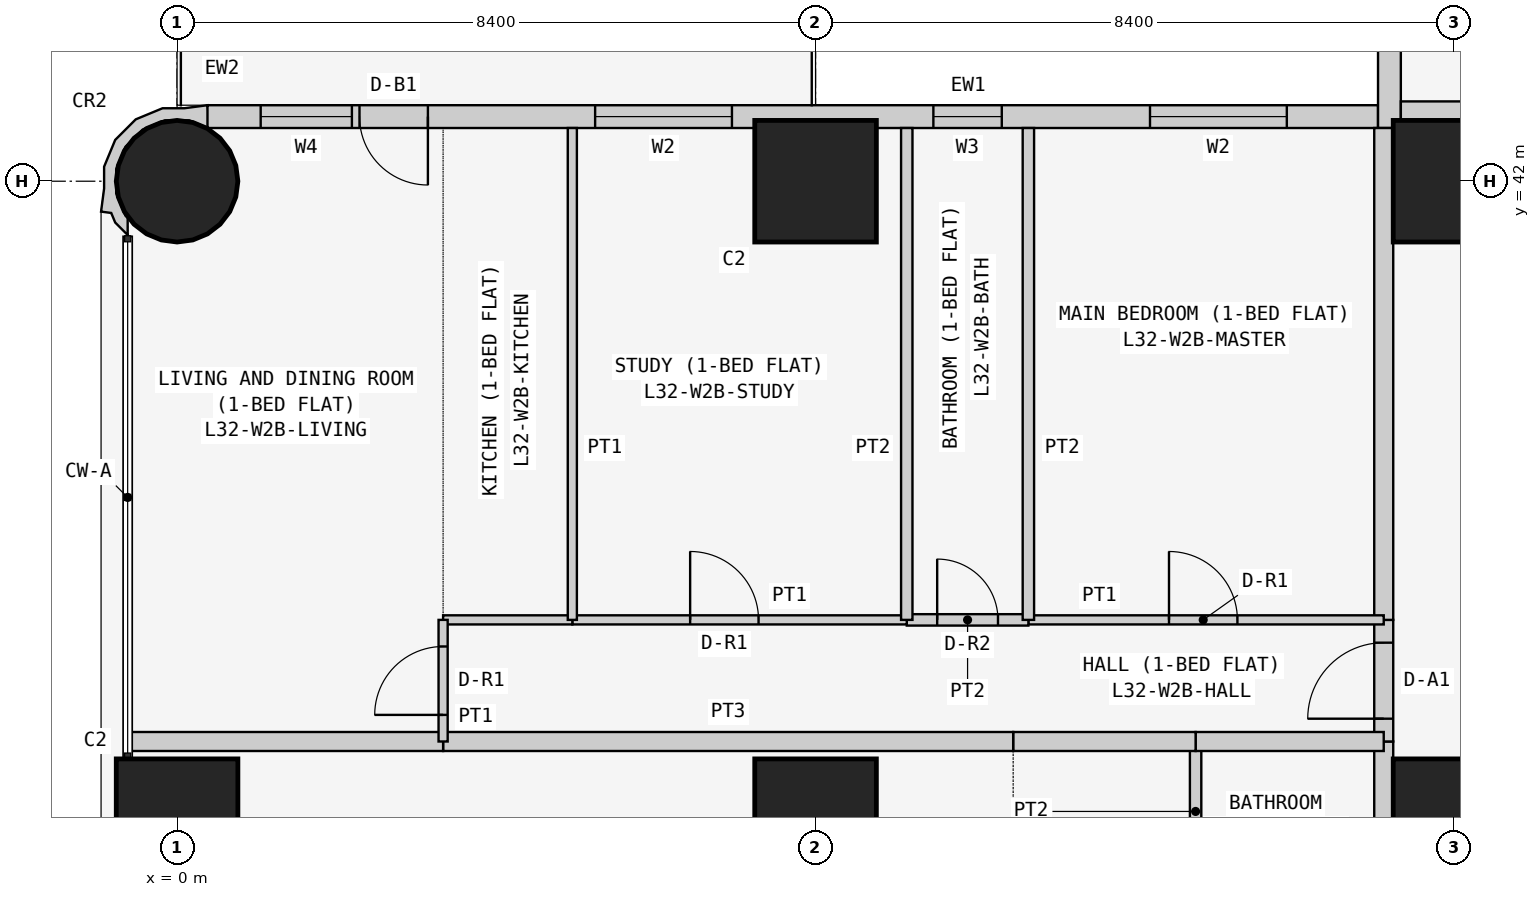
"""IFC4 building model, lengths in metres.
Left out: names, types, materials, properties, quantities, classifications, styles, units other than length and angle.
Written with IfcOpenShell. Run it as: python <this file> out.ifc"""

import sys

from ifc_helpers import new_model, si_unit, direction, frame, frame_2d, origin, origin_2d, place, context, subcontext, project, spatial, polyline, rectangle, circle, outline, extrude, element, fill, save


model = new_model("IFC4")
c1 = context("Model", 3, precision=1e-05, world=origin(), true_north=direction((0.0, 1.0)))
c2 = subcontext(c1, "Body", "Model", "MODEL_VIEW")
j1 = project(units=[si_unit("LENGTHUNIT", "METRE"), si_unit("PLANEANGLEUNIT", "RADIAN")], contexts=[c1])
p1 = place(None, origin())
s1 = spatial("IfcSite", under=j1, at=p1, CompositionType="ELEMENT")
p2 = place(p1, origin())
s2 = spatial("IfcBuilding", under=s1, at=p2, CompositionType="ELEMENT")
p3 = place(p2, frame((0.0, 0.0, 126.9)))
s3 = spatial("IfcBuildingStorey", under=s2, at=p3, CompositionType="ELEMENT", Elevation=126.9)
p4 = place(p3, frame((0.0, 33.6, 0.0), z_axis=(0.0, 0.0, 1.0), x_axis=(1.0, 0.0, 0.0)))
e1 = element("IfcColumn", 1, at=p4, inside=s3, PredefinedType="COLUMN", context=c2, shape_type="SweptSolid", body=[
    extrude(rectangle(XDim=1.6, YDim=1.6, at=origin_2d()), origin(), (0.0, 0.0, 1.0), 3.6),
])
p5 = place(p3, frame((0.0, 42.0, 0.0), z_axis=(0.0, 0.0, 1.0), x_axis=(1.0, 0.0, 0.0)))
e2 = element("IfcColumn", 2, at=p5, inside=s3, PredefinedType="COLUMN", context=c2, shape_type="SweptSolid", body=[
    extrude(circle(Radius=0.8, at=origin_2d()), origin(), (0.0, 0.0, 1.0), 3.6),
])
for number, where, z_axis, x_axis in (
    (3, (8.4, 33.6, 0.0), (0.0, 0.0, 1.0), (1.0, 0.0, 0.0)),
    (4, (8.4, 42.0, 0.0), (0.0, 0.0, 1.0), (1.0, 0.0, 0.0)),
    (5, (16.8, 33.6, 0.0), (0.0, 0.0, 1.0), (1.0, 0.0, 0.0)),
    (6, (16.8, 42.0, 0.0), (0.0, 0.0, 1.0), (1.0, 0.0, 0.0)),
):
    element("IfcColumn", number, at=place(p3, frame(where, z_axis=z_axis, x_axis=x_axis)), inside=s3, PredefinedType="COLUMN", context=c2, shape_type="SweptSolid", body=[
        extrude(rectangle(XDim=1.6, YDim=1.6, at=origin_2d()), origin(), (0.0, 0.0, 1.0), 3.6),
    ])
p6 = place(p3, frame((15.8, 42.85, 0.0), z_axis=(0.0, 0.0, 1.0), x_axis=(-1.0, 0.0, 0.0)))
e7 = element("IfcWall", 7, at=p6, inside=s3, PredefinedType="SOLIDWALL", context=c2, shape_type="SweptSolid", body=[
    extrude(rectangle(XDim=15.4, YDim=0.3, at=frame_2d((7.7, 0.0))), origin(), (0.0, 0.0, 1.0), 3.45),
])
p7 = place(p6, frame((1.2, 0.0, 0.9)))
e8 = element("IfcOpeningElement", 8, at=p7, cuts=e7, PredefinedType="OPENING", context=c2, shape_type="SweptSolid", body=[
    extrude(rectangle(XDim=1.8, YDim=1.5, at=frame_2d((0.9, 0.75))), frame((0.0, 0.16, 0.0), z_axis=(0.0, -1.0, 0.0), x_axis=(1.0, 0.0, 0.0)), (0.0, 0.0, 1.0), 0.32),
])
p8 = place(p6, frame((4.95, 0.0, 1.5)))
e9 = element("IfcOpeningElement", 9, at=p8, cuts=e7, PredefinedType="OPENING", context=c2, shape_type="SweptSolid", body=[
    extrude(rectangle(XDim=0.9, YDim=0.7, at=frame_2d((0.45, 0.35))), frame((0.0, 0.16, 0.0), z_axis=(0.0, -1.0, 0.0), x_axis=(1.0, 0.0, 0.0)), (0.0, 0.0, 1.0), 0.32),
])
p9 = place(p6, frame((8.5, 0.0, 0.9)))
e10 = element("IfcOpeningElement", 10, at=p9, cuts=e7, PredefinedType="OPENING", context=c2, shape_type="SweptSolid", body=[
    extrude(rectangle(XDim=1.8, YDim=1.5, at=frame_2d((0.9, 0.75))), frame((0.0, 0.16, 0.0), z_axis=(0.0, -1.0, 0.0), x_axis=(1.0, 0.0, 0.0)), (0.0, 0.0, 1.0), 0.32),
])
p10 = place(p6, frame((12.5, 0.0, 0.0)))
e11 = element("IfcOpeningElement", 11, at=p10, cuts=e7, PredefinedType="OPENING", context=c2, shape_type="SweptSolid", body=[
    extrude(rectangle(XDim=0.9, YDim=2.4, at=frame_2d((0.45, 1.2))), frame((0.0, 0.16, 0.0), z_axis=(0.0, -1.0, 0.0), x_axis=(1.0, 0.0, 0.0)), (0.0, 0.0, 1.0), 0.32),
])
p11 = place(p6, frame((13.5, 0.0, 0.9)))
e12 = element("IfcOpeningElement", 12, at=p11, cuts=e7, PredefinedType="OPENING", context=c2, shape_type="SweptSolid", body=[
    extrude(rectangle(XDim=1.2, YDim=1.5, at=frame_2d((0.6, 0.75))), frame((0.0, 0.16, 0.0), z_axis=(0.0, -1.0, 0.0), x_axis=(1.0, 0.0, 0.0)), (0.0, 0.0, 1.0), 0.32),
])
p12 = place(p3, frame((15.95, 50.0, 0.0), z_axis=(0.0, 0.0, 1.0), x_axis=(0.0, -1.0, 0.0)))
e13 = element("IfcWall", 13, at=p12, inside=s3, PredefinedType="SOLIDWALL", context=c2, shape_type="SweptSolid", body=[
    extrude(rectangle(XDim=7.3, YDim=0.3, at=frame_2d((3.65, 0.0))), origin(), (0.0, 0.0, 1.0), 3.45),
])
p13 = place(p12, frame((3.1, 0.0, 0.9)))
e14 = element("IfcOpeningElement", 14, at=p13, cuts=e13, PredefinedType="OPENING", context=c2, shape_type="SweptSolid", body=[
    extrude(rectangle(XDim=2.4, YDim=1.5, at=frame_2d((1.2, 0.75))), frame((0.0, 0.16, 0.0), z_axis=(0.0, -1.0, 0.0), x_axis=(1.0, 0.0, 0.0)), (0.0, 0.0, 1.0), 0.32),
])
p14 = place(p12, frame((0.75, 0.0, 0.9)))
e15 = element("IfcOpeningElement", 15, at=p14, cuts=e13, PredefinedType="OPENING", context=c2, shape_type="SweptSolid", body=[
    extrude(rectangle(XDim=1.2, YDim=1.5, at=frame_2d((0.6, 0.75))), frame((0.0, 0.16, 0.0), z_axis=(0.0, -1.0, 0.0), x_axis=(1.0, 0.0, 0.0)), (0.0, 0.0, 1.0), 0.32),
])
p15 = place(p3, frame((0.327, 42.817, 0.0), z_axis=(0.0, 0.0, 1.0), x_axis=(-0.93923434088, 0.343276641956, 0.0)))
e16 = element("IfcWall", 16, at=p15, inside=s3, PredefinedType="SOLIDWALL", context=c2, shape_type="SweptSolid", body=[
    extrude(outline(polyline([(-0.006, -0.197), (0.266, -0.055), (0.535, 0.044), (0.816, 0.302), (0.977, 0.648), (0.994, 1.03), (0.895, 1.299), (0.828, 1.598), (0.697, 1.569), (0.604, 1.67), (0.394, 1.767), (0.471, 1.556), (0.509, 1.539), (0.724, 1.304), (0.833, 1.005), (0.82, 0.687), (0.686, 0.397), (0.451, 0.182), (0.152, 0.073), (-0.116, 0.084), (-0.127, 0.078), (-0.146, 0.071), (-0.006, -0.197)])), origin(), (0.0, 0.0, 1.0), 3.45),
])
p16 = place(p3, frame((16.1, 42.925, 0.0), z_axis=(0.0, 0.0, 1.0), x_axis=(1.0, 0.0, 0.0)))
e17 = element("IfcWall", 17, at=p16, inside=s3, PredefinedType="PARTITIONING", context=c2, shape_type="SweptSolid", body=[
    extrude(rectangle(XDim=6.471, YDim=0.25, at=frame_2d((3.235, 0.0))), origin(), (0.0, 0.0, 1.0), 3.45),
])
p17 = place(p3, frame((15.875, 32.0, 0.0), z_axis=(0.0, 0.0, 1.0), x_axis=(0.0, 1.0, 0.0)))
e18 = element("IfcWall", 18, at=p17, inside=s3, PredefinedType="PARTITIONING", context=c2, shape_type="SweptSolid", body=[
    extrude(rectangle(XDim=2.629, YDim=0.25, at=frame_2d((1.314, 0.0))), origin(), (0.0, 0.0, 1.0), 3.45),
])
p18 = place(p3, frame((15.875, 34.629, 0.0), z_axis=(0.0, 0.0, 1.0), x_axis=(0.0, 1.0, 0.0)))
e19 = element("IfcWall", 19, at=p18, inside=s3, PredefinedType="PARTITIONING", context=c2, shape_type="SweptSolid", body=[
    extrude(rectangle(XDim=1.6, YDim=0.25, at=frame_2d((0.8, 0.0))), origin(), (0.0, 0.0, 1.0), 3.45),
])
p19 = place(p18, frame((0.3, 0.0, 0.0)))
e20 = element("IfcOpeningElement", 20, at=p19, cuts=e19, PredefinedType="OPENING", context=c2, shape_type="SweptSolid", body=[
    extrude(rectangle(XDim=1.0, YDim=2.1, at=frame_2d((0.5, 1.05))), frame((0.0, 0.135, 0.0), z_axis=(0.0, -1.0, 0.0), x_axis=(1.0, 0.0, 0.0)), (0.0, 0.0, 1.0), 0.27),
])
p20 = place(p3, frame((15.875, 36.229, 0.0), z_axis=(0.0, 0.0, 1.0), x_axis=(0.0, 1.0, 0.0)))
e21 = element("IfcWall", 21, at=p20, inside=s3, PredefinedType="PARTITIONING", context=c2, shape_type="SweptSolid", body=[
    extrude(rectangle(XDim=6.471, YDim=0.25, at=frame_2d((3.235, 0.0))), origin(), (0.0, 0.0, 1.0), 3.45),
])
p21 = place(p3, frame((13.4, 32.0, 0.0), z_axis=(0.0, 0.0, 1.0), x_axis=(0.0, 1.0, 0.0)))
e22 = element("IfcWall", 22, at=p21, inside=s3, PredefinedType="PARTITIONING", context=c2, shape_type="SweptSolid", body=[
    extrude(rectangle(XDim=2.629, YDim=0.15, at=frame_2d((1.314, 0.0))), origin(), (0.0, 0.0, 1.0), 3.45),
])
p22 = place(p3, frame((13.4, 34.629, 0.0), z_axis=(0.0, 0.0, 1.0), x_axis=(1.0, 0.0, 0.0)))
e23 = element("IfcWall", 23, at=p22, inside=s3, PredefinedType="PARTITIONING", context=c2, shape_type="SweptSolid", body=[
    extrude(rectangle(XDim=2.475, YDim=0.25, at=frame_2d((1.238, 0.0))), origin(), (0.0, 0.0, 1.0), 3.45),
])
p23 = place(p3, frame((11.0, 34.629, 0.0), z_axis=(0.0, 0.0, 1.0), x_axis=(1.0, 0.0, 0.0)))
e24 = element("IfcWall", 24, at=p23, inside=s3, PredefinedType="PARTITIONING", context=c2, shape_type="SweptSolid", body=[
    extrude(rectangle(XDim=2.4, YDim=0.25, at=frame_2d((1.2, 0.0))), origin(), (0.0, 0.0, 1.0), 3.45),
])
p24 = place(p3, frame((3.5, 34.629, 0.0), z_axis=(0.0, 0.0, 1.0), x_axis=(1.0, 0.0, 0.0)))
e25 = element("IfcWall", 25, at=p24, inside=s3, PredefinedType="PARTITIONING", context=c2, shape_type="SweptSolid", body=[
    extrude(rectangle(XDim=7.5, YDim=0.25, at=frame_2d((3.75, 0.0))), origin(), (0.0, 0.0, 1.0), 3.45),
])
p25 = place(p3, frame((-0.65, 34.629, 0.0), z_axis=(0.0, 0.0, 1.0), x_axis=(1.0, 0.0, 0.0)))
e26 = element("IfcWall", 26, at=p25, inside=s3, PredefinedType="PARTITIONING", context=c2, shape_type="SweptSolid", body=[
    extrude(rectangle(XDim=4.15, YDim=0.25, at=frame_2d((2.075, 0.0))), origin(), (0.0, 0.0, 1.0), 3.45),
])
p26 = place(p3, frame((11.2, 36.229, 0.0), z_axis=(0.0, 0.0, 1.0), x_axis=(1.0, 0.0, 0.0)))
e27 = element("IfcWall", 27, at=p26, inside=s3, PredefinedType="PARTITIONING", context=c2, shape_type="SweptSolid", body=[
    extrude(rectangle(XDim=4.675, YDim=0.12, at=frame_2d((2.337, 0.0))), origin(), (0.0, 0.0, 1.0), 3.45),
])
p27 = place(p26, frame((1.85, 0.0, 0.0)))
e28 = element("IfcOpeningElement", 28, at=p27, cuts=e27, PredefinedType="OPENING", context=c2, shape_type="SweptSolid", body=[
    extrude(rectangle(XDim=0.9, YDim=2.1, at=frame_2d((0.45, 1.05))), frame((0.0, 0.07, 0.0), z_axis=(0.0, -1.0, 0.0), x_axis=(1.0, 0.0, 0.0)), (0.0, 0.0, 1.0), 0.14),
])
p28 = place(p3, frame((9.6, 36.229, 0.0), z_axis=(0.0, 0.0, 1.0), x_axis=(1.0, 0.0, 0.0)))
e29 = element("IfcWall", 29, at=p28, inside=s3, PredefinedType="PARTITIONING", context=c2, shape_type="SweptSolid", body=[
    extrude(rectangle(XDim=1.6, YDim=0.15, at=frame_2d((0.8, 0.0))), origin(), (0.0, 0.0, 1.0), 3.45),
])
p29 = place(p28, frame((0.4, 0.0, 0.0)))
e30 = element("IfcOpeningElement", 30, at=p29, cuts=e29, PredefinedType="OPENING", context=c2, shape_type="SweptSolid", body=[
    extrude(rectangle(XDim=0.8, YDim=2.1, at=frame_2d((0.4, 1.05))), frame((0.0, 0.085, 0.0), z_axis=(0.0, -1.0, 0.0), x_axis=(1.0, 0.0, 0.0)), (0.0, 0.0, 1.0), 0.17),
])
p30 = place(p3, frame((5.2, 36.229, 0.0), z_axis=(0.0, 0.0, 1.0), x_axis=(1.0, 0.0, 0.0)))
e31 = element("IfcWall", 31, at=p30, inside=s3, PredefinedType="PARTITIONING", context=c2, shape_type="SweptSolid", body=[
    extrude(rectangle(XDim=4.4, YDim=0.12, at=frame_2d((2.2, 0.0))), origin(), (0.0, 0.0, 1.0), 3.45),
])
p31 = place(p30, frame((1.55, 0.0, 0.0)))
e32 = element("IfcOpeningElement", 32, at=p31, cuts=e31, PredefinedType="OPENING", context=c2, shape_type="SweptSolid", body=[
    extrude(rectangle(XDim=0.9, YDim=2.1, at=frame_2d((0.45, 1.05))), frame((0.0, 0.07, 0.0), z_axis=(0.0, -1.0, 0.0), x_axis=(1.0, 0.0, 0.0)), (0.0, 0.0, 1.0), 0.14),
])
p32 = place(p3, frame((3.5, 36.229, 0.0), z_axis=(0.0, 0.0, 1.0), x_axis=(1.0, 0.0, 0.0)))
e33 = element("IfcWall", 33, at=p32, inside=s3, PredefinedType="PARTITIONING", context=c2, shape_type="SweptSolid", body=[
    extrude(rectangle(XDim=1.7, YDim=0.12, at=frame_2d((0.85, 0.0))), origin(), (0.0, 0.0, 1.0), 3.45),
])
p33 = place(p3, frame((3.5, 34.629, 0.0), z_axis=(0.0, 0.0, 1.0), x_axis=(0.0, 1.0, 0.0)))
e34 = element("IfcWall", 34, at=p33, inside=s3, PredefinedType="PARTITIONING", context=c2, shape_type="SweptSolid", body=[
    extrude(rectangle(XDim=1.6, YDim=0.12, at=frame_2d((0.8, 0.0))), origin(), (0.0, 0.0, 1.0), 3.45),
])
p34 = place(p33, frame((0.35, 0.0, 0.0)))
e35 = element("IfcOpeningElement", 35, at=p34, cuts=e34, PredefinedType="OPENING", context=c2, shape_type="SweptSolid", body=[
    extrude(rectangle(XDim=0.9, YDim=2.1, at=frame_2d((0.45, 1.05))), frame((0.0, 0.07, 0.0), z_axis=(0.0, -1.0, 0.0), x_axis=(1.0, 0.0, 0.0)), (0.0, 0.0, 1.0), 0.14),
])
for number, where, z_axis, x_axis in (
    (36, (11.2, 36.229, 0.0), (0.0, 0.0, 1.0), (0.0, 1.0, 0.0)),
    (37, (9.6, 36.229, 0.0), (0.0, 0.0, 1.0), (0.0, 1.0, 0.0)),
):
    element("IfcWall", number, at=place(p3, frame(where, z_axis=z_axis, x_axis=x_axis)), inside=s3, PredefinedType="PARTITIONING", context=c2, shape_type="SweptSolid", body=[
        extrude(rectangle(XDim=6.471, YDim=0.15, at=frame_2d((3.235, 0.0))), origin(), (0.0, 0.0, 1.0), 3.45),
    ])
p35 = place(p3, frame((5.2, 36.229, 0.0), z_axis=(0.0, 0.0, 1.0), x_axis=(0.0, 1.0, 0.0)))
e38 = element("IfcWall", 38, at=p35, inside=s3, PredefinedType="PARTITIONING", context=c2, shape_type="SweptSolid", body=[
    extrude(rectangle(XDim=6.471, YDim=0.12, at=frame_2d((3.235, 0.0))), origin(), (0.0, 0.0, 1.0), 3.45),
])
p36 = place(p7, origin())
e39 = element("IfcWindow", 39, at=p36, inside=s3, PartitioningType="SINGLE_PANEL", PredefinedType="WINDOW", context=c2, shape_type="SweptSolid", body=[
    extrude(rectangle(XDim=1.8, YDim=1.5, at=frame_2d((0.9, 0.75))), frame((0.0, 0.03, 0.0), z_axis=(0.0, -1.0, 0.0), x_axis=(1.0, 0.0, 0.0)), (0.0, 0.0, 1.0), 0.06),
])
fill(e8, e39)
p37 = place(p8, origin())
e40 = element("IfcWindow", 40, at=p37, inside=s3, PartitioningType="SINGLE_PANEL", PredefinedType="WINDOW", context=c2, shape_type="SweptSolid", body=[
    extrude(rectangle(XDim=0.9, YDim=0.7, at=frame_2d((0.45, 0.35))), frame((0.0, 0.03, 0.0), z_axis=(0.0, -1.0, 0.0), x_axis=(1.0, 0.0, 0.0)), (0.0, 0.0, 1.0), 0.06),
])
fill(e9, e40)
p38 = place(p9, origin())
e41 = element("IfcWindow", 41, at=p38, inside=s3, PartitioningType="SINGLE_PANEL", PredefinedType="WINDOW", context=c2, shape_type="SweptSolid", body=[
    extrude(rectangle(XDim=1.8, YDim=1.5, at=frame_2d((0.9, 0.75))), frame((0.0, 0.03, 0.0), z_axis=(0.0, -1.0, 0.0), x_axis=(1.0, 0.0, 0.0)), (0.0, 0.0, 1.0), 0.06),
])
fill(e10, e41)
p39 = place(p10, origin())
e42 = element("IfcDoor", 42, at=p39, inside=s3, OperationType="SINGLE_SWING_LEFT", PredefinedType="DOOR", context=c2, shape_type="SweptSolid", body=[
    extrude(rectangle(XDim=0.9, YDim=2.4, at=frame_2d((0.45, 1.2))), frame((0.0, 0.025, 0.0), z_axis=(0.0, -1.0, 0.0), x_axis=(1.0, 0.0, 0.0)), (0.0, 0.0, 1.0), 0.05),
])
fill(e11, e42)
p40 = place(p11, origin())
e43 = element("IfcWindow", 43, at=p40, inside=s3, PartitioningType="SINGLE_PANEL", PredefinedType="WINDOW", context=c2, shape_type="SweptSolid", body=[
    extrude(rectangle(XDim=1.2, YDim=1.5, at=frame_2d((0.6, 0.75))), frame((0.0, 0.03, 0.0), z_axis=(0.0, -1.0, 0.0), x_axis=(1.0, 0.0, 0.0)), (0.0, 0.0, 1.0), 0.06),
])
fill(e12, e43)
p41 = place(p19, origin())
e44 = element("IfcDoor", 44, at=p41, inside=s3, OperationType="SINGLE_SWING_LEFT", PredefinedType="DOOR", context=c2, shape_type="SweptSolid", body=[
    extrude(rectangle(XDim=1.0, YDim=2.1, at=frame_2d((0.5, 1.05))), frame((0.0, 0.025, 0.0), z_axis=(0.0, -1.0, 0.0), x_axis=(1.0, 0.0, 0.0)), (0.0, 0.0, 1.0), 0.05),
])
fill(e20, e44)
p42 = place(p27, origin())
e45 = element("IfcDoor", 45, at=p42, inside=s3, OperationType="SINGLE_SWING_LEFT", PredefinedType="DOOR", context=c2, shape_type="SweptSolid", body=[
    extrude(rectangle(XDim=0.9, YDim=2.1, at=frame_2d((0.45, 1.05))), frame((0.0, 0.025, 0.0), z_axis=(0.0, -1.0, 0.0), x_axis=(1.0, 0.0, 0.0)), (0.0, 0.0, 1.0), 0.05),
])
fill(e28, e45)
p43 = place(p29, origin())
e46 = element("IfcDoor", 46, at=p43, inside=s3, OperationType="SINGLE_SWING_LEFT", PredefinedType="DOOR", context=c2, shape_type="SweptSolid", body=[
    extrude(rectangle(XDim=0.8, YDim=2.1, at=frame_2d((0.4, 1.05))), frame((0.0, 0.025, 0.0), z_axis=(0.0, -1.0, 0.0), x_axis=(1.0, 0.0, 0.0)), (0.0, 0.0, 1.0), 0.05),
])
fill(e30, e46)
p44 = place(p31, origin())
e47 = element("IfcDoor", 47, at=p44, inside=s3, OperationType="SINGLE_SWING_LEFT", PredefinedType="DOOR", context=c2, shape_type="SweptSolid", body=[
    extrude(rectangle(XDim=0.9, YDim=2.1, at=frame_2d((0.45, 1.05))), frame((0.0, 0.025, 0.0), z_axis=(0.0, -1.0, 0.0), x_axis=(1.0, 0.0, 0.0)), (0.0, 0.0, 1.0), 0.05),
])
fill(e32, e47)
p45 = place(p34, origin())
e48 = element("IfcDoor", 48, at=p45, inside=s3, OperationType="SINGLE_SWING_LEFT", PredefinedType="DOOR", context=c2, shape_type="SweptSolid", body=[
    extrude(rectangle(XDim=0.9, YDim=2.1, at=frame_2d((0.45, 1.05))), frame((0.0, 0.025, 0.0), z_axis=(0.0, -1.0, 0.0), x_axis=(1.0, 0.0, 0.0)), (0.0, 0.0, 1.0), 0.05),
])
fill(e35, e48)
save(model, sys.argv[1])
